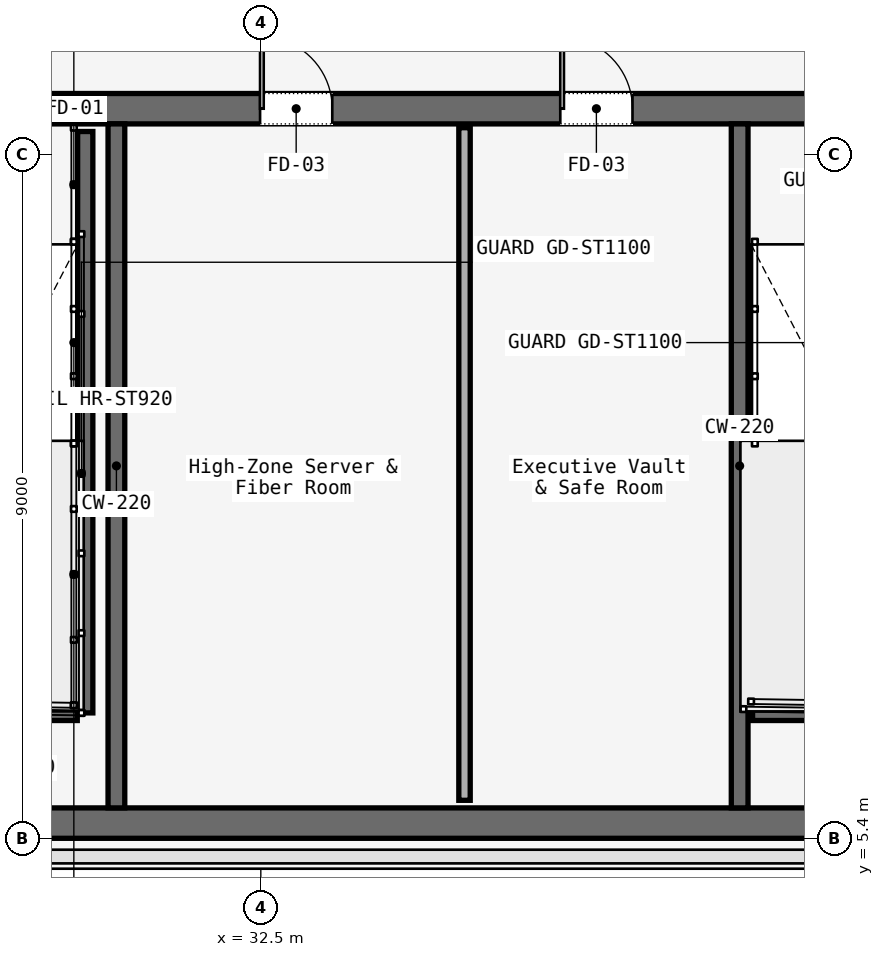
"""IFC4 building model, lengths in metres.
Left out: names, types, materials, properties, quantities, classifications, styles, units other than length and angle.
Written with IfcOpenShell. Run it as: python <this file> out.ifc"""

import sys

from ifc_helpers import new_model, si_unit, direction, frame, frame_2d, origin, place, context, subcontext, project, spatial, rectangle, extrude, element, fill, save


model = new_model("IFC4")
c1 = context("Model", 3, precision=1e-05, world=origin(), true_north=direction((0.0, 1.0)))
c2 = subcontext(c1, "Body", "Model", "MODEL_VIEW")
j1 = project(units=[si_unit("LENGTHUNIT", "METRE"), si_unit("PLANEANGLEUNIT", "RADIAN")], contexts=[c1])
p1 = place(None, origin())
s1 = spatial("IfcSite", under=j1, at=p1, CompositionType="ELEMENT")
p2 = place(p1, origin())
s2 = spatial("IfcBuilding", under=s1, at=p2, CompositionType="ELEMENT")
p3 = place(p2, frame((0.0, 0.0, 225.6)))
s3 = spatial("IfcBuildingStorey", under=s2, at=p3, CompositionType="ELEMENT", Elevation=225.6)
p4 = place(p3, frame((26.45, 15.0, 0.0), z_axis=(0.0, 0.0, 1.0), x_axis=(1.0, 0.0, 0.0)))
e1 = element("IfcWall", 1, at=p4, inside=s3, PredefinedType="SOLIDWALL", context=c2, shape_type="SweptSolid", body=[
    extrude(rectangle(XDim=31.1, YDim=0.4, at=frame_2d((15.55, 0.0))), origin(), (0.0, 0.0, 1.0), 3.58),
])
p5 = place(p4, frame((1.65, 0.0, 0.0)))
e2 = element("IfcOpeningElement", 2, at=p5, cuts=e1, PredefinedType="OPENING", context=c2, shape_type="SweptSolid", body=[
    extrude(rectangle(XDim=1.1, YDim=2.2, at=frame_2d((0.55, 1.1))), frame((0.0, 0.2, 0.0), z_axis=(0.0, -1.0, 0.0), x_axis=(1.0, 0.0, 0.0)), (0.0, 0.0, 1.0), 0.4),
])
p6 = place(p4, frame((13.65, 0.0, 0.0)))
e3 = element("IfcOpeningElement", 3, at=p6, cuts=e1, PredefinedType="OPENING", context=c2, shape_type="SweptSolid", body=[
    extrude(rectangle(XDim=1.1, YDim=2.2, at=frame_2d((0.55, 1.1))), frame((0.0, 0.2, 0.0), z_axis=(0.0, -1.0, 0.0), x_axis=(1.0, 0.0, 0.0)), (0.0, 0.0, 1.0), 0.4),
])
p7 = place(p4, frame((25.55, 0.0, 0.0)))
e4 = element("IfcOpeningElement", 4, at=p7, cuts=e1, PredefinedType="OPENING", context=c2, shape_type="SweptSolid", body=[
    extrude(rectangle(XDim=1.1, YDim=2.2, at=frame_2d((0.55, 1.1))), frame((0.0, 0.2, 0.0), z_axis=(0.0, -1.0, 0.0), x_axis=(1.0, 0.0, 0.0)), (0.0, 0.0, 1.0), 0.4),
])
p8 = place(p4, frame((19.35, 0.0, 0.0)))
e5 = element("IfcOpeningElement", 5, at=p8, cuts=e1, PredefinedType="OPENING", context=c2, shape_type="SweptSolid", body=[
    extrude(rectangle(XDim=1.1, YDim=2.2, at=frame_2d((0.55, 1.1))), frame((0.0, 0.2, 0.0), z_axis=(0.0, -1.0, 0.0), x_axis=(1.0, 0.0, 0.0)), (0.0, 0.0, 1.0), 0.4),
])
p9 = place(p4, frame((21.4, 0.0, 0.0)))
e6 = element("IfcOpeningElement", 6, at=p9, cuts=e1, PredefinedType="OPENING", context=c2, shape_type="SweptSolid", body=[
    extrude(rectangle(XDim=0.9, YDim=2.1, at=frame_2d((0.45, 1.05))), frame((0.0, 0.2, 0.0), z_axis=(0.0, -1.0, 0.0), x_axis=(1.0, 0.0, 0.0)), (0.0, 0.0, 1.0), 0.4),
])
p10 = place(p4, frame((6.04, 0.0, 0.0)))
e7 = element("IfcOpeningElement", 7, at=p10, cuts=e1, PredefinedType="OPENING", context=c2, shape_type="SweptSolid", body=[
    extrude(rectangle(XDim=0.95, YDim=2.2, at=frame_2d((0.475, 1.1))), frame((0.0, 0.2, 0.0), z_axis=(0.0, -1.0, 0.0), x_axis=(1.0, 0.0, 0.0)), (0.0, 0.0, 1.0), 0.4),
])
p11 = place(p4, frame((9.99, 0.0, 0.0)))
e8 = element("IfcOpeningElement", 8, at=p11, cuts=e1, PredefinedType="OPENING", context=c2, shape_type="SweptSolid", body=[
    extrude(rectangle(XDim=0.95, YDim=2.2, at=frame_2d((0.475, 1.1))), frame((0.0, 0.2, 0.0), z_axis=(0.0, -1.0, 0.0), x_axis=(1.0, 0.0, 0.0)), (0.0, 0.0, 1.0), 0.4),
])
p12 = place(p4, frame((23.35, 0.0, 0.0)))
e9 = element("IfcOpeningElement", 9, at=p12, cuts=e1, PredefinedType="OPENING", context=c2, shape_type="SweptSolid", body=[
    extrude(rectangle(XDim=1.3, YDim=2.3, at=frame_2d((0.65, 1.15))), frame((0.0, 0.2, 0.0), z_axis=(0.0, -1.0, 0.0), x_axis=(1.0, 0.0, 0.0)), (0.0, 0.0, 1.0), 0.4),
])
p13 = place(p3, frame((26.45, 5.6, 0.0), z_axis=(0.0, 0.0, 1.0), x_axis=(1.0, 0.0, 0.0)))
e10 = element("IfcWall", 10, at=p13, inside=s3, PredefinedType="SOLIDWALL", context=c2, shape_type="SweptSolid", body=[
    extrude(rectangle(XDim=31.1, YDim=0.4, at=frame_2d((15.55, 0.0))), origin(), (0.0, 0.0, 1.0), 3.58),
])
for number, where, z_axis, x_axis in (
    (11, (30.6, 5.8, 0.0), (0.0, 0.0, 1.0), (0.0, 1.0, 0.0)),
    (12, (38.8, 5.8, 0.0), (0.0, 0.0, 1.0), (0.0, 1.0, 0.0)),
):
    element("IfcWall", number, at=place(p3, frame(where, z_axis=z_axis, x_axis=x_axis)), inside=s3, PredefinedType="SOLIDWALL", context=c2, shape_type="SweptSolid", body=[
        extrude(rectangle(XDim=9.0, YDim=0.22, at=frame_2d((4.5, 0.0))), origin(), (0.0, 0.0, 1.0), 3.58),
    ])
p14 = place(p3, frame((30.19, 14.7, 0.0), z_axis=(0.0, 0.0, 1.0), x_axis=(0.0, -1.0, 0.0)))
e13 = element("IfcWall", 13, at=p14, inside=s3, PredefinedType="SOLIDWALL", context=c2, shape_type="SweptSolid", body=[
    extrude(rectangle(XDim=7.65, YDim=0.2, at=frame_2d((3.825, 0.0))), origin(), (0.0, 0.0, 1.0), 3.8),
])
for number, where, z_axis, x_axis in (
    (14, (26.97, 7.05, 0.0), (0.0, 0.0, 1.0), (1.0, 0.0, 0.0)),
    (15, (38.97, 7.05, 0.0), (0.0, 0.0, 1.0), (1.0, 0.0, 0.0)),
):
    element("IfcWall", number, at=place(p3, frame(where, z_axis=z_axis, x_axis=x_axis)), inside=s3, PredefinedType="SOLIDWALL", context=c2, shape_type="SweptSolid", body=[
        extrude(rectangle(XDim=3.115, YDim=0.2, at=frame_2d((1.558, 0.0))), origin(), (0.0, 0.0, 1.0), 3.8),
    ])
p15 = place(p3, frame((35.18, 5.9, 0.0), z_axis=(0.0, 0.0, 1.0), x_axis=(0.0, 1.0, 0.0)))
e16 = element("IfcWall", 16, at=p15, inside=s3, PredefinedType="PARTITIONING", context=c2, shape_type="SweptSolid", body=[
    extrude(rectangle(XDim=8.85, YDim=0.15, at=frame_2d((4.425, 0.0))), origin(), (0.0, 0.0, 1.0), 3.01),
])
p16 = place(p10, origin())
e17 = element("IfcDoor", 17, at=p16, inside=s3, OperationType="SINGLE_SWING_LEFT", PredefinedType="DOOR", context=c2, shape_type="SweptSolid", body=[
    extrude(rectangle(XDim=0.95, YDim=2.2, at=frame_2d((0.475, 1.1))), frame((0.0, 0.025, 0.0), z_axis=(0.0, -1.0, 0.0), x_axis=(1.0, 0.0, 0.0)), (0.0, 0.0, 1.0), 0.05),
])
fill(e7, e17)
p17 = place(p11, origin())
e18 = element("IfcDoor", 18, at=p17, inside=s3, OperationType="SINGLE_SWING_RIGHT", PredefinedType="DOOR", context=c2, shape_type="SweptSolid", body=[
    extrude(rectangle(XDim=0.95, YDim=2.2, at=frame_2d((0.475, 1.1))), frame((0.0, 0.025, 0.0), z_axis=(0.0, -1.0, 0.0), x_axis=(1.0, 0.0, 0.0)), (0.0, 0.0, 1.0), 0.05),
])
fill(e8, e18)
save(model, sys.argv[1])
